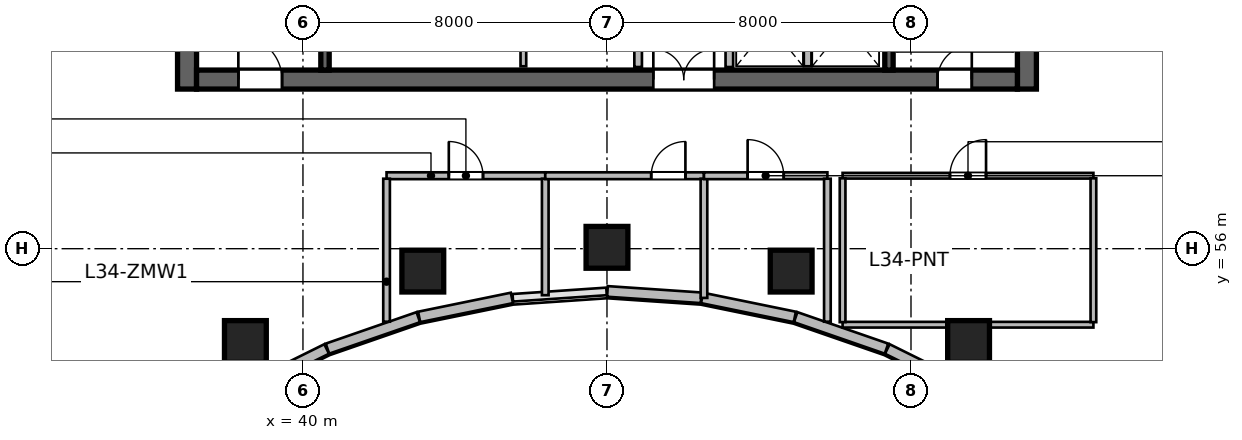
"""IFC4 building model, lengths in metres.
Left out: names, types, materials, properties, quantities, classifications, styles, units other than length and angle.
Written with IfcOpenShell. Run it as: python <this file> out.ifc"""

import sys

from ifc_helpers import new_model, si_unit, direction, frame, frame_2d, origin, origin_2d, place, context, subcontext, project, spatial, rectangle, circle, extrude, source, transform, mapped, element, fill, save


model = new_model("IFC4")
c1 = context("Model", 3, precision=1e-05, world=origin(), true_north=direction((0.0, 1.0)))
c2 = subcontext(c1, "Body", "Model", "MODEL_VIEW")
j1 = project(units=[si_unit("LENGTHUNIT", "METRE"), si_unit("PLANEANGLEUNIT", "RADIAN")], contexts=[c1])
p1 = place(None, origin())
s1 = spatial("IfcSite", under=j1, at=p1, CompositionType="ELEMENT")
p2 = place(p1, origin())
s2 = spatial("IfcBuilding", under=s1, at=p2, CompositionType="ELEMENT")
p3 = place(p2, frame((0.0, 0.0, 142.8)))
s3 = spatial("IfcBuildingStorey", under=s2, at=p3, CompositionType="ELEMENT", Elevation=142.8)
m1 = source(origin(), c2, "Body", "SweptSolid", [
    extrude(rectangle(XDim=12.0, YDim=0.5, at=frame_2d((6.0, 0.0))), origin(), (0.0, 0.0, 1.0), 3.9),
])
for number, where, z_axis, x_axis in (
    (1, (36.95, 60.2, 0.0), (0.0, 0.0, 1.0), (0.0, 1.0, 0.0)),
    (2, (59.05, 60.2, 0.0), (0.0, 0.0, 1.0), (0.0, 1.0, 0.0)),
):
    element("IfcWall", number, at=place(p3, frame(where, z_axis=z_axis, x_axis=x_axis)), inside=s3, PredefinedType="SHEAR", context=c2, shape_type="MappedRepresentation", body=[
        mapped(m1, transform((0.0, 0.0, 0.0), scale=1.0)),
    ])
m2 = source(origin(), c2, "Body", "SweptSolid", [
    extrude(rectangle(XDim=21.6, YDim=0.5, at=frame_2d((10.8, 0.0))), origin(), (0.0, 0.0, 1.0), 3.9),
])
p4 = place(p3, frame((37.2, 60.45, 0.0), z_axis=(0.0, 0.0, 1.0), x_axis=(1.0, 0.0, 0.0)))
e3 = element("IfcWall", 3, at=p4, inside=s3, PredefinedType="SHEAR", context=c2, shape_type="MappedRepresentation", body=[
    mapped(m2, transform((0.0, 0.0, 0.0), scale=1.0)),
])
p5 = place(p4, frame((1.1, 0.0, 0.0)))
e4 = element("IfcOpeningElement", 4, at=p5, cuts=e3, PredefinedType="OPENING", context=c2, shape_type="SweptSolid", body=[
    extrude(rectangle(XDim=1.15, YDim=2.15, at=frame_2d((0.575, 1.075))), frame((0.0, 0.26, 0.0), z_axis=(0.0, -1.0, 0.0), x_axis=(1.0, 0.0, 0.0)), (0.0, 0.0, 1.0), 0.52),
])
p6 = place(p4, frame((19.5, 0.0, 0.0)))
e5 = element("IfcOpeningElement", 5, at=p6, cuts=e3, PredefinedType="OPENING", context=c2, shape_type="SweptSolid", body=[
    extrude(rectangle(XDim=0.9, YDim=2.1, at=frame_2d((0.45, 1.05))), frame((0.0, 0.26, 0.0), z_axis=(0.0, -1.0, 0.0), x_axis=(1.0, 0.0, 0.0)), (0.0, 0.0, 1.0), 0.52),
])
p7 = place(p4, frame((12.02, 0.0, 0.0)))
e6 = element("IfcOpeningElement", 6, at=p7, cuts=e3, PredefinedType="OPENING", context=c2, shape_type="SweptSolid", body=[
    extrude(rectangle(XDim=1.6, YDim=2.15, at=frame_2d((0.8, 1.075))), frame((0.0, 0.26, 0.0), z_axis=(0.0, -1.0, 0.0), x_axis=(1.0, 0.0, 0.0)), (0.0, 0.0, 1.0), 0.52),
])
m3 = source(origin(), c2, "Body", "SweptSolid", [
    extrude(rectangle(XDim=11.0, YDim=0.22, at=frame_2d((5.5, 0.0))), origin(), (0.0, 0.0, 1.0), 3.9),
])
p8 = place(p3, frame((40.58, 60.7, 0.0), z_axis=(0.0, 0.0, 1.0), x_axis=(0.0, 1.0, 0.0)))
e7 = element("IfcWall", 7, at=p8, inside=s3, PredefinedType="SHEAR", context=c2, shape_type="MappedRepresentation", body=[
    mapped(m3, transform((0.0, 0.0, 0.0), scale=1.0)),
])
p9 = place(p3, frame((55.42, 60.7, 0.0), z_axis=(0.0, 0.0, 1.0), x_axis=(0.0, 1.0, 0.0)))
e8 = element("IfcWall", 8, at=p9, inside=s3, PredefinedType="SHEAR", context=c2, shape_type="MappedRepresentation", body=[
    mapped(m3, transform((0.0, 0.0, 0.0), scale=1.0)),
])
p10 = place(p9, frame((9.545, 0.0, 0.0)))
e9 = element("IfcOpeningElement", 9, at=p10, cuts=e8, PredefinedType="OPENING", context=c2, shape_type="SweptSolid", body=[
    extrude(rectangle(XDim=1.15, YDim=2.15, at=frame_2d((0.575, 1.075))), frame((0.0, 0.12, 0.0), z_axis=(0.0, -1.0, 0.0), x_axis=(1.0, 0.0, 0.0)), (0.0, 0.0, 1.0), 0.24),
])
m4 = source(origin(), c2, "Body", "SweptSolid", [
    extrude(circle(Radius=0.55, at=origin_2d()), origin(), (0.0, 0.0, 1.0), 3.9),
])
for number, where, z_axis, x_axis in (
    (10, (38.485, 53.558, 0.0), (0.0, 0.0, 1.0), (-0.289, 0.957, 0.0)),
    (11, (43.154, 55.411, 0.0), (0.0, 0.0, 1.0), (-0.143, 0.99, 0.0)),
    (12, (48.0, 56.036, 0.0), (0.0, 0.0, 1.0), (0.0, 1.0, 0.0)),
    (13, (52.846, 55.411, 0.0), (0.0, 0.0, 1.0), (0.143, 0.99, 0.0)),
    (14, (57.515, 53.558, 0.0), (0.0, 0.0, 1.0), (0.289, 0.957, 0.0)),
):
    element("IfcColumn", number, at=place(p3, frame(where, z_axis=z_axis, x_axis=x_axis)), inside=s3, PredefinedType="COLUMN", context=c2, shape_type="MappedRepresentation", body=[
        mapped(m4, transform((0.0, 0.0, 0.0), scale=1.0)),
    ])
m5 = source(origin(), c2, "Body", "SweptSolid", [
    extrude(rectangle(XDim=2.584, YDim=0.28, at=frame_2d((1.292, 0.0))), origin(), (0.0, 0.0, 1.0), 3.65),
])
p11 = place(p3, frame((57.692, 52.213, 0.0), z_axis=(0.0, 0.0, 1.0), x_axis=(-0.895989792847, 0.44407464588, 0.0)))
e15 = element("IfcWall", 15, at=p11, inside=s3, PredefinedType="SOLIDWALL", context=c2, shape_type="MappedRepresentation", body=[
    mapped(m5, transform((0.0, 0.0, 0.0), scale=1.0)),
])
m6 = source(origin(), c2, "Body", "SweptSolid", [
    extrude(rectangle(XDim=2.53, YDim=0.28, at=frame_2d((1.265, 0.0))), origin(), (0.0, 0.0, 1.0), 3.65),
])
p12 = place(p3, frame((55.355, 53.37, 0.0), z_axis=(0.0, 0.0, 1.0), x_axis=(-0.944872429646, 0.327438683872, 0.0)))
e16 = element("IfcWall", 16, at=p12, inside=s3, PredefinedType="SOLIDWALL", context=c2, shape_type="MappedRepresentation", body=[
    mapped(m6, transform((0.0, 0.0, 0.0), scale=1.0)),
])
m7 = source(origin(), c2, "Body", "SweptSolid", [
    extrude(rectangle(XDim=2.491, YDim=0.28, at=frame_2d((1.246, 0.0))), origin(), (0.0, 0.0, 1.0), 3.65),
])
p13 = place(p3, frame((52.942, 54.205, 0.0), z_axis=(0.0, 0.0, 1.0), x_axis=(-0.979630885979, 0.200806691214, 0.0)))
e17 = element("IfcWall", 17, at=p13, inside=s3, PredefinedType="SOLIDWALL", context=c2, shape_type="MappedRepresentation", body=[
    mapped(m7, transform((0.0, 0.0, 0.0), scale=1.0)),
])
m8 = source(origin(), c2, "Body", "SweptSolid", [
    extrude(rectangle(XDim=2.471, YDim=0.28, at=frame_2d((1.236, 0.0))), origin(), (0.0, 0.0, 1.0), 3.65),
])
p14 = place(p3, frame((50.478, 54.708, 0.0), z_axis=(0.0, 0.0, 1.0), x_axis=(-0.997708006929, 0.067666335123, 0.0)))
e18 = element("IfcWall", 18, at=p14, inside=s3, PredefinedType="SOLIDWALL", context=c2, shape_type="MappedRepresentation", body=[
    mapped(m8, transform((0.0, 0.0, 0.0), scale=1.0)),
])
p15 = place(p3, frame((45.498, 54.705, 0.0), z_axis=(0.0, 0.0, 1.0), x_axis=(-0.979630885979, -0.200806691214, 0.0)))
e19 = element("IfcWall", 19, at=p15, inside=s3, PredefinedType="SOLIDWALL", context=c2, shape_type="MappedRepresentation", body=[
    mapped(m7, transform((0.0, 0.0, 0.0), scale=1.0)),
])
p16 = place(p3, frame((43.035, 54.198, 0.0), z_axis=(0.0, 0.0, 1.0), x_axis=(-0.944872429646, -0.327438683872, 0.0)))
e20 = element("IfcWall", 20, at=p16, inside=s3, PredefinedType="SOLIDWALL", context=c2, shape_type="MappedRepresentation", body=[
    mapped(m6, transform((0.0, 0.0, 0.0), scale=1.0)),
])
p17 = place(p3, frame((40.624, 53.361, 0.0), z_axis=(0.0, 0.0, 1.0), x_axis=(-0.895989792847, -0.44407464588, 0.0)))
e21 = element("IfcWall", 21, at=p17, inside=s3, PredefinedType="SOLIDWALL", context=c2, shape_type="MappedRepresentation", body=[
    mapped(m5, transform((0.0, 0.0, 0.0), scale=1.0)),
])
m9 = source(origin(), c2, "Body", "SweptSolid", [
    extrude(rectangle(XDim=2.24, YDim=0.2, at=frame_2d((1.12, 0.0))), origin(), (0.0, 0.0, 1.0), 3.65),
])
for number, where, z_axis, x_axis in (
    (22, (48.82, 60.78, 0.0), (0.0, 0.0, 1.0), (0.0, 1.0, 0.0)),
    (23, (51.22, 60.78, 0.0), (0.0, 0.0, 1.0), (0.0, 1.0, 0.0)),
):
    element("IfcWall", number, at=place(p3, frame(where, z_axis=z_axis, x_axis=x_axis)), inside=s3, PredefinedType="SOLIDWALL", context=c2, shape_type="MappedRepresentation", body=[
        mapped(m9, transform((0.0, 0.0, 0.0), scale=1.0)),
    ])
m10 = source(origin(), c2, "Body", "SweptSolid", [
    extrude(rectangle(XDim=2.2, YDim=0.15, at=frame_2d((1.1, 0.0))), origin(), (0.0, 0.0, 1.0), 3.65),
])
p18 = place(p3, frame((45.8, 60.8, 0.0), z_axis=(0.0, 0.0, 1.0), x_axis=(0.0, 1.0, 0.0)))
e24 = element("IfcWall", 24, at=p18, inside=s3, PredefinedType="PARTITIONING", context=c2, shape_type="MappedRepresentation", body=[
    mapped(m10, transform((0.0, 0.0, 0.0), scale=1.0)),
])
m11 = source(origin(), c2, "Body", "SweptSolid", [
    extrude(rectangle(XDim=2.2, YDim=0.2, at=frame_2d((1.1, 0.0))), origin(), (0.0, 0.0, 1.0), 3.65),
])
p19 = place(p3, frame((53.28, 60.8, 0.0), z_axis=(0.0, 0.0, 1.0), x_axis=(0.0, 1.0, 0.0)))
e25 = element("IfcWall", 25, at=p19, inside=s3, PredefinedType="SOLIDWALL", context=c2, shape_type="MappedRepresentation", body=[
    mapped(m11, transform((0.0, 0.0, 0.0), scale=1.0)),
])
m12 = source(origin(), c2, "Body", "SweptSolid", [
    extrude(rectangle(XDim=4.176, YDim=0.18, at=frame_2d((2.088, 0.0))), origin(), (0.0, 0.0, 1.0), 3.65),
])
p20 = place(p3, frame((42.2, 57.92, 0.0), z_axis=(0.0, 0.0, 1.0), x_axis=(1.0, 0.0, 0.0)))
e26 = element("IfcWall", 26, at=p20, inside=s3, PredefinedType="PLUMBINGWALL", context=c2, shape_type="MappedRepresentation", body=[
    mapped(m12, transform((0.0, 0.0, 0.0), scale=1.0)),
])
p21 = place(p20, frame((1.638, 0.0, 0.0)))
e27 = element("IfcOpeningElement", 27, at=p21, cuts=e26, PredefinedType="OPENING", context=c2, shape_type="SweptSolid", body=[
    extrude(rectangle(XDim=0.9, YDim=2.08, at=frame_2d((0.45, 1.04))), frame((0.0, 0.1, 0.0), z_axis=(0.0, -1.0, 0.0), x_axis=(1.0, 0.0, 0.0)), (0.0, 0.0, 1.0), 0.2),
])
m13 = source(origin(), c2, "Body", "SweptSolid", [
    extrude(rectangle(XDim=3.763, YDim=0.175, at=frame_2d((1.881, 0.0))), origin(), (0.0, 0.0, 1.0), 3.65),
])
p22 = place(p3, frame((42.2, 54.079, 0.0), z_axis=(0.0, 0.0, 1.0), x_axis=(0.0, 1.0, 0.0)))
e28 = element("IfcWall", 28, at=p22, inside=s3, PredefinedType="PARTITIONING", context=c2, shape_type="MappedRepresentation", body=[
    mapped(m13, transform((0.0, 0.0, 0.0), scale=1.0)),
])
m14 = source(origin(), c2, "Body", "SweptSolid", [
    extrude(rectangle(XDim=3.065, YDim=0.175, at=frame_2d((1.533, 0.0))), origin(), (0.0, 0.0, 1.0), 3.65),
])
p23 = place(p3, frame((46.376, 54.776, 0.0), z_axis=(0.0, 0.0, 1.0), x_axis=(0.0, 1.0, 0.0)))
e29 = element("IfcWall", 29, at=p23, inside=s3, PredefinedType="PARTITIONING", context=c2, shape_type="MappedRepresentation", body=[
    mapped(m14, transform((0.0, 0.0, 0.0), scale=1.0)),
])
p24 = place(p3, frame((46.376, 57.92, 0.0), z_axis=(0.0, 0.0, 1.0), x_axis=(1.0, 0.0, 0.0)))
e30 = element("IfcWall", 30, at=p24, inside=s3, PredefinedType="PLUMBINGWALL", context=c2, shape_type="MappedRepresentation", body=[
    mapped(m12, transform((0.0, 0.0, 0.0), scale=1.0)),
])
p25 = place(p24, frame((2.788, 0.0, 0.0)))
e31 = element("IfcOpeningElement", 31, at=p25, cuts=e30, PredefinedType="OPENING", context=c2, shape_type="SweptSolid", body=[
    extrude(rectangle(XDim=0.9, YDim=2.08, at=frame_2d((0.45, 1.04))), frame((0.0, 0.1, 0.0), z_axis=(0.0, -1.0, 0.0), x_axis=(1.0, 0.0, 0.0)), (0.0, 0.0, 1.0), 0.2),
])
m15 = source(origin(), c2, "Body", "SweptSolid", [
    extrude(rectangle(XDim=3.136, YDim=0.175, at=frame_2d((1.568, 0.0))), origin(), (0.0, 0.0, 1.0), 3.65),
])
p26 = place(p3, frame((50.552, 54.705, 0.0), z_axis=(0.0, 0.0, 1.0), x_axis=(0.0, 1.0, 0.0)))
e32 = element("IfcWall", 32, at=p26, inside=s3, PredefinedType="PARTITIONING", context=c2, shape_type="MappedRepresentation", body=[
    mapped(m15, transform((0.0, 0.0, 0.0), scale=1.0)),
])
m16 = source(origin(), c2, "Body", "SweptSolid", [
    extrude(rectangle(XDim=3.248, YDim=0.18, at=frame_2d((1.624, 0.0))), origin(), (0.0, 0.0, 1.0), 3.65),
])
p27 = place(p3, frame((50.552, 57.92, 0.0), z_axis=(0.0, 0.0, 1.0), x_axis=(1.0, 0.0, 0.0)))
e33 = element("IfcWall", 33, at=p27, inside=s3, PredefinedType="PLUMBINGWALL", context=c2, shape_type="MappedRepresentation", body=[
    mapped(m16, transform((0.0, 0.0, 0.0), scale=1.0)),
])
p28 = place(p27, frame((1.149, 0.0, 0.0)))
e34 = element("IfcOpeningElement", 34, at=p28, cuts=e33, PredefinedType="OPENING", context=c2, shape_type="SweptSolid", body=[
    extrude(rectangle(XDim=0.95, YDim=2.12, at=frame_2d((0.475, 1.06))), frame((0.0, 0.1, 0.0), z_axis=(0.0, -1.0, 0.0), x_axis=(1.0, 0.0, 0.0)), (0.0, 0.0, 1.0), 0.2),
])
p29 = place(p3, frame((53.8, 54.079, 0.0), z_axis=(0.0, 0.0, 1.0), x_axis=(0.0, 1.0, 0.0)))
e35 = element("IfcWall", 35, at=p29, inside=s3, PredefinedType="PARTITIONING", context=c2, shape_type="MappedRepresentation", body=[
    mapped(m13, transform((0.0, 0.0, 0.0), scale=1.0)),
])
m17 = source(origin(), c2, "Body", "SweptSolid", [
    extrude(rectangle(XDim=6.6, YDim=0.15, at=frame_2d((3.3, 0.0))), origin(), (0.0, 0.0, 1.0), 3.095),
])
p30 = place(p3, frame((54.2, 54.0, 0.0), z_axis=(0.0, 0.0, 1.0), x_axis=(1.0, 0.0, 0.0)))
e36 = element("IfcWall", 36, at=p30, inside=s3, PredefinedType="PARTITIONING", context=c2, shape_type="MappedRepresentation", body=[
    mapped(m17, transform((0.0, 0.0, 0.0), scale=1.0)),
])
m18 = source(origin(), c2, "Body", "SweptSolid", [
    extrude(rectangle(XDim=6.6, YDim=0.15, at=frame_2d((3.3, 0.0))), origin(), (0.0, 0.0, 1.0), 3.65),
])
p31 = place(p3, frame((54.2, 57.92, 0.0), z_axis=(0.0, 0.0, 1.0), x_axis=(1.0, 0.0, 0.0)))
e37 = element("IfcWall", 37, at=p31, inside=s3, PredefinedType="PARTITIONING", context=c2, shape_type="MappedRepresentation", body=[
    mapped(m18, transform((0.0, 0.0, 0.0), scale=1.0)),
])
p32 = place(p31, frame((2.825, 0.0, 0.0)))
e38 = element("IfcOpeningElement", 38, at=p32, cuts=e37, PredefinedType="OPENING", context=c2, shape_type="SweptSolid", body=[
    extrude(rectangle(XDim=0.95, YDim=2.1, at=frame_2d((0.475, 1.05))), frame((0.0, 0.085, 0.0), z_axis=(0.0, -1.0, 0.0), x_axis=(1.0, 0.0, 0.0)), (0.0, 0.0, 1.0), 0.17),
])
m19 = source(origin(), c2, "Body", "SweptSolid", [
    extrude(rectangle(XDim=3.785, YDim=0.15, at=frame_2d((1.893, 0.0))), origin(), (0.0, 0.0, 1.0), 3.65),
])
for number, where, z_axis, x_axis in (
    (39, (54.2, 54.067, 0.0), (0.0, 0.0, 1.0), (0.0, 1.0, 0.0)),
    (40, (60.8, 54.067, 0.0), (0.0, 0.0, 1.0), (0.0, 1.0, 0.0)),
):
    element("IfcWall", number, at=place(p3, frame(where, z_axis=z_axis, x_axis=x_axis)), inside=s3, PredefinedType="PARTITIONING", context=c2, shape_type="MappedRepresentation", body=[
        mapped(m19, transform((0.0, 0.0, 0.0), scale=1.0)),
    ])
m20 = source(origin(), c2, "Body", "SweptSolid", [
    extrude(rectangle(XDim=1.15, YDim=2.15, at=frame_2d((0.575, 1.075))), frame((0.0, 0.025, 0.0), z_axis=(0.0, -1.0, 0.0), x_axis=(1.0, 0.0, 0.0)), (0.0, 0.0, 1.0), 0.05),
])
p33 = place(p5, origin())
e41 = element("IfcDoor", 41, at=p33, inside=s3, OperationType="SINGLE_SWING_LEFT", PredefinedType="DOOR", context=c2, shape_type="MappedRepresentation", body=[
    mapped(m20, transform((0.0, 0.0, 0.0), scale=1.0)),
])
fill(e4, e41)
m21 = source(origin(), c2, "Body", "SweptSolid", [
    extrude(rectangle(XDim=0.9, YDim=2.1, at=frame_2d((0.45, 1.05))), frame((0.0, 0.025, 0.0), z_axis=(0.0, -1.0, 0.0), x_axis=(1.0, 0.0, 0.0)), (0.0, 0.0, 1.0), 0.05),
])
p34 = place(p6, origin())
e42 = element("IfcDoor", 42, at=p34, inside=s3, OperationType="SINGLE_SWING_RIGHT", PredefinedType="DOOR", context=c2, shape_type="MappedRepresentation", body=[
    mapped(m21, transform((0.0, 0.0, 0.0), scale=1.0)),
])
fill(e5, e42)
m22 = source(origin(), c2, "Body", "SweptSolid", [
    extrude(rectangle(XDim=1.6, YDim=2.15, at=frame_2d((0.8, 1.075))), frame((0.0, 0.025, 0.0), z_axis=(0.0, -1.0, 0.0), x_axis=(1.0, 0.0, 0.0)), (0.0, 0.0, 1.0), 0.05),
])
p35 = place(p7, origin())
e43 = element("IfcDoor", 43, at=p35, inside=s3, OperationType="DOUBLE_DOOR_SINGLE_SWING", PredefinedType="DOOR", context=c2, shape_type="MappedRepresentation", body=[
    mapped(m22, transform((0.0, 0.0, 0.0), scale=1.0)),
])
fill(e6, e43)
m23 = source(origin(), c2, "Body", "SweptSolid", [
    extrude(rectangle(XDim=0.9, YDim=2.08, at=frame_2d((0.45, 1.04))), frame((0.0, 0.025, 0.0), z_axis=(0.0, -1.0, 0.0), x_axis=(1.0, 0.0, 0.0)), (0.0, 0.0, 1.0), 0.05),
])
p36 = place(p21, origin())
e44 = element("IfcDoor", 44, at=p36, inside=s3, OperationType="SINGLE_SWING_LEFT", PredefinedType="DOOR", context=c2, shape_type="MappedRepresentation", body=[
    mapped(m23, transform((0.0, 0.0, 0.0), scale=1.0)),
])
fill(e27, e44)
p37 = place(p25, origin())
e45 = element("IfcDoor", 45, at=p37, inside=s3, OperationType="SINGLE_SWING_RIGHT", PredefinedType="DOOR", context=c2, shape_type="MappedRepresentation", body=[
    mapped(m23, transform((0.0, 0.0, 0.0), scale=1.0)),
])
fill(e31, e45)
m24 = source(origin(), c2, "Body", "SweptSolid", [
    extrude(rectangle(XDim=0.95, YDim=2.12, at=frame_2d((0.475, 1.06))), frame((0.0, 0.025, 0.0), z_axis=(0.0, -1.0, 0.0), x_axis=(1.0, 0.0, 0.0)), (0.0, 0.0, 1.0), 0.05),
])
p38 = place(p28, origin())
e46 = element("IfcDoor", 46, at=p38, inside=s3, OperationType="SINGLE_SWING_LEFT", PredefinedType="DOOR", context=c2, shape_type="MappedRepresentation", body=[
    mapped(m24, transform((0.0, 0.0, 0.0), scale=1.0)),
])
fill(e34, e46)
m25 = source(origin(), c2, "Body", "SweptSolid", [
    extrude(rectangle(XDim=0.95, YDim=2.1, at=frame_2d((0.475, 1.05))), frame((0.0, 0.025, 0.0), z_axis=(0.0, -1.0, 0.0), x_axis=(1.0, 0.0, 0.0)), (0.0, 0.0, 1.0), 0.05),
])
p39 = place(p32, origin())
e47 = element("IfcDoor", 47, at=p39, inside=s3, OperationType="SINGLE_SWING_RIGHT", PredefinedType="DOOR", context=c2, shape_type="MappedRepresentation", body=[
    mapped(m25, transform((0.0, 0.0, 0.0), scale=1.0)),
])
fill(e38, e47)
save(model, sys.argv[1])
